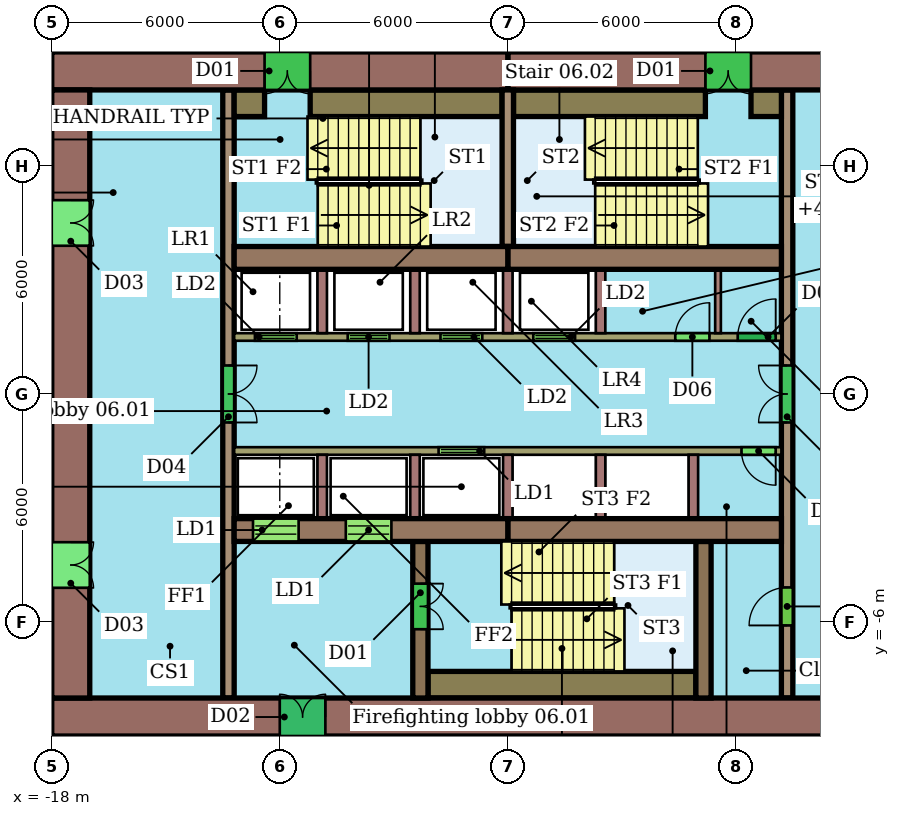
"""IFC4 building model, lengths in metres.
Left out: names, types, materials, properties, quantities, classifications, styles, units other than length and angle.
Written with IfcOpenShell. Run it as: python <this file> out.ifc"""

import sys

from ifc_helpers import new_model, si_unit, direction, frame, frame_2d, origin, place, context, subcontext, project, spatial, rectangle, extrude, element, fill, save


model = new_model("IFC4")
c1 = context("Model", 3, precision=1e-05, world=origin(), true_north=direction((0.0, 1.0)))
c2 = subcontext(c1, "Body", "Model", "MODEL_VIEW")
j1 = project(units=[si_unit("LENGTHUNIT", "METRE"), si_unit("PLANEANGLEUNIT", "RADIAN")], contexts=[c1])
p1 = place(None, origin())
s1 = spatial("IfcSite", under=j1, at=p1, CompositionType="ELEMENT")
p2 = place(p1, origin())
s2 = spatial("IfcBuilding", under=s1, at=p2, CompositionType="ELEMENT")
p3 = place(p2, frame((0.0, 0.0, 39.7)))
s3 = spatial("IfcBuildingStorey", under=s2, at=p3, CompositionType="ELEMENT", Elevation=39.7)
p4 = place(p3, frame((6.0, 8.5, 0.0), z_axis=(0.0, 0.0, 1.0), x_axis=(-1.0, 0.0, 0.0)))
e1 = element("IfcWall", 1, at=p4, inside=s3, PredefinedType="SHEAR", context=c2, shape_type="SweptSolid", body=[
    extrude(rectangle(XDim=12.0, YDim=1.0, at=frame_2d((6.0, 0.0))), origin(), (0.0, 0.0, 1.0), 3.4),
])
p5 = place(p4, frame((5.6, 0.0, 0.0)))
e2 = element("IfcOpeningElement", 2, at=p5, cuts=e1, PredefinedType="OPENING", context=c2, shape_type="SweptSolid", body=[
    extrude(rectangle(XDim=1.2, YDim=2.1, at=frame_2d((0.6, 1.05))), frame((0.0, 0.51, 0.0), z_axis=(0.0, -1.0, 0.0), x_axis=(1.0, 0.0, 0.0)), (0.0, 0.0, 1.0), 1.02),
])
p6 = place(p3, frame((-6.0, 8.5, 0.0), z_axis=(0.0, 0.0, 1.0), x_axis=(-1.0, 0.0, 0.0)))
e3 = element("IfcWall", 3, at=p6, inside=s3, PredefinedType="SHEAR", context=c2, shape_type="SweptSolid", body=[
    extrude(rectangle(XDim=12.0, YDim=1.0, at=frame_2d((6.0, 0.0))), origin(), (0.0, 0.0, 1.0), 3.4),
])
p7 = place(p6, frame((5.2, 0.0, 0.0)))
e4 = element("IfcOpeningElement", 4, at=p7, cuts=e3, PredefinedType="OPENING", context=c2, shape_type="SweptSolid", body=[
    extrude(rectangle(XDim=1.2, YDim=2.1, at=frame_2d((0.6, 1.05))), frame((0.0, 0.51, 0.0), z_axis=(0.0, -1.0, 0.0), x_axis=(1.0, 0.0, 0.0)), (0.0, 0.0, 1.0), 1.02),
])
p8 = place(p3, frame((-18.0, -8.5, 0.0), z_axis=(0.0, 0.0, 1.0), x_axis=(1.0, 0.0, 0.0)))
e5 = element("IfcWall", 5, at=p8, inside=s3, PredefinedType="SHEAR", context=c2, shape_type="SweptSolid", body=[
    extrude(rectangle(XDim=24.0, YDim=1.0, at=frame_2d((12.0, 0.0))), origin(), (0.0, 0.0, 1.0), 3.4),
])
p9 = place(p8, frame((6.0, 0.0, 0.0)))
e6 = element("IfcOpeningElement", 6, at=p9, cuts=e5, PredefinedType="OPENING", context=c2, shape_type="SweptSolid", body=[
    extrude(rectangle(XDim=1.2, YDim=2.1, at=frame_2d((0.6, 1.05))), frame((0.0, 0.51, 0.0), z_axis=(0.0, -1.0, 0.0), x_axis=(1.0, 0.0, 0.0)), (0.0, 0.0, 1.0), 1.02),
])
p10 = place(p3, frame((-17.5, 8.0, 0.0), z_axis=(0.0, 0.0, 1.0), x_axis=(0.0, -1.0, 0.0)))
e7 = element("IfcWall", 7, at=p10, inside=s3, PredefinedType="SHEAR", context=c2, shape_type="SweptSolid", body=[
    extrude(rectangle(XDim=16.0, YDim=1.0, at=frame_2d((8.0, 0.0))), origin(), (0.0, 0.0, 1.0), 3.4),
])
p11 = place(p10, frame((11.9, 0.0, 0.0)))
e8 = element("IfcOpeningElement", 8, at=p11, cuts=e7, PredefinedType="OPENING", context=c2, shape_type="SweptSolid", body=[
    extrude(rectangle(XDim=1.2, YDim=2.1, at=frame_2d((0.6, 1.05))), frame((0.0, 0.51, 0.0), z_axis=(0.0, -1.0, 0.0), x_axis=(1.0, 0.0, 0.0)), (0.0, 0.0, 1.0), 1.02),
])
p12 = place(p10, frame((2.9, 0.0, 0.0)))
e9 = element("IfcOpeningElement", 9, at=p12, cuts=e7, PredefinedType="OPENING", context=c2, shape_type="SweptSolid", body=[
    extrude(rectangle(XDim=1.2, YDim=2.1, at=frame_2d((0.6, 1.05))), frame((0.0, 0.51, 0.0), z_axis=(0.0, -1.0, 0.0), x_axis=(1.0, 0.0, 0.0)), (0.0, 0.0, 1.0), 1.02),
])
for number, where, z_axis, x_axis in (
    (10, (-13.2, 3.58, 0.0), (0.0, 0.0, 1.0), (1.0, 0.0, 0.0)),
    (11, (-6.0, 3.58, 0.0), (0.0, 0.0, 1.0), (1.0, 0.0, 0.0)),
):
    element("IfcWall", number, at=place(p3, frame(where, z_axis=z_axis, x_axis=x_axis)), inside=s3, PredefinedType="SHEAR", context=c2, shape_type="SweptSolid", body=[
        extrude(rectangle(XDim=7.2, YDim=0.6, at=frame_2d((3.6, 0.0))), origin(), (0.0, 0.0, 1.0), 3.4),
    ])
p13 = place(p3, frame((-13.2, -3.58, 0.0), z_axis=(0.0, 0.0, 1.0), x_axis=(1.0, 0.0, 0.0)))
e12 = element("IfcWall", 12, at=p13, inside=s3, PredefinedType="SHEAR", context=c2, shape_type="SweptSolid", body=[
    extrude(rectangle(XDim=7.2, YDim=0.6, at=frame_2d((3.6, 0.0))), origin(), (0.0, 0.0, 1.0), 3.4),
])
p14 = place(p13, frame((0.496, 0.0, 0.0)))
e13 = element("IfcOpeningElement", 13, at=p14, cuts=e12, PredefinedType="OPENING", context=c2, shape_type="SweptSolid", body=[
    extrude(rectangle(XDim=1.2, YDim=2.1, at=frame_2d((0.6, 1.05))), frame((0.0, 0.31, 0.0), z_axis=(0.0, -1.0, 0.0), x_axis=(1.0, 0.0, 0.0)), (0.0, 0.0, 1.0), 0.62),
])
p15 = place(p13, frame((2.938, 0.0, 0.0)))
e14 = element("IfcOpeningElement", 14, at=p15, cuts=e12, PredefinedType="OPENING", context=c2, shape_type="SweptSolid", body=[
    extrude(rectangle(XDim=1.2, YDim=2.1, at=frame_2d((0.6, 1.05))), frame((0.0, 0.31, 0.0), z_axis=(0.0, -1.0, 0.0), x_axis=(1.0, 0.0, 0.0)), (0.0, 0.0, 1.0), 0.62),
])
p16 = place(p3, frame((-6.0, -3.58, 0.0), z_axis=(0.0, 0.0, 1.0), x_axis=(1.0, 0.0, 0.0)))
e15 = element("IfcWall", 15, at=p16, inside=s3, PredefinedType="SHEAR", context=c2, shape_type="SweptSolid", body=[
    extrude(rectangle(XDim=7.2, YDim=0.6, at=frame_2d((3.6, 0.0))), origin(), (0.0, 0.0, 1.0), 3.4),
])
p17 = place(p3, frame((-13.35, 8.0, 0.0), z_axis=(0.0, 0.0, 1.0), x_axis=(0.0, -1.0, 0.0)))
e16 = element("IfcWall", 16, at=p17, inside=s3, PredefinedType="SHEAR", context=c2, shape_type="SweptSolid", body=[
    extrude(rectangle(XDim=16.0, YDim=0.3, at=frame_2d((8.0, 0.0))), origin(), (0.0, 0.0, 1.0), 3.4),
])
p18 = place(p17, frame((7.25, 0.0, 0.0)))
e17 = element("IfcOpeningElement", 17, at=p18, cuts=e16, PredefinedType="OPENING", context=c2, shape_type="SweptSolid", body=[
    extrude(rectangle(XDim=1.5, YDim=2.1, at=frame_2d((0.75, 1.05))), frame((0.0, 0.16, 0.0), z_axis=(0.0, -1.0, 0.0), x_axis=(1.0, 0.0, 0.0)), (0.0, 0.0, 1.0), 0.32),
])
p19 = place(p3, frame((1.35, -8.0, 0.0), z_axis=(0.0, 0.0, 1.0), x_axis=(0.0, 1.0, 0.0)))
e18 = element("IfcWall", 18, at=p19, inside=s3, PredefinedType="SHEAR", context=c2, shape_type="SweptSolid", body=[
    extrude(rectangle(XDim=16.0, YDim=0.3, at=frame_2d((8.0, 0.0))), origin(), (0.0, 0.0, 1.0), 3.4),
])
p20 = place(p19, frame((1.91, 0.0, 0.0)))
e19 = element("IfcOpeningElement", 19, at=p20, cuts=e18, PredefinedType="OPENING", context=c2, shape_type="SweptSolid", body=[
    extrude(rectangle(XDim=1.0, YDim=2.1, at=frame_2d((0.5, 1.05))), frame((0.0, 0.16, 0.0), z_axis=(0.0, -1.0, 0.0), x_axis=(1.0, 0.0, 0.0)), (0.0, 0.0, 1.0), 0.32),
])
p21 = place(p19, frame((7.25, 0.0, 0.0)))
e20 = element("IfcOpeningElement", 20, at=p21, cuts=e18, PredefinedType="OPENING", context=c2, shape_type="SweptSolid", body=[
    extrude(rectangle(XDim=1.5, YDim=2.1, at=frame_2d((0.75, 1.05))), frame((0.0, 0.16, 0.0), z_axis=(0.0, -1.0, 0.0), x_axis=(1.0, 0.0, 0.0)), (0.0, 0.0, 1.0), 0.32),
])
p22 = place(p3, frame((-13.2, 1.5, 0.0), z_axis=(0.0, 0.0, 1.0), x_axis=(1.0, 0.0, 0.0)))
e21 = element("IfcWall", 21, at=p22, inside=s3, PredefinedType="SHEAR", context=c2, shape_type="SweptSolid", body=[
    extrude(rectangle(XDim=14.4, YDim=0.2, at=frame_2d((7.2, 0.0))), origin(), (0.0, 0.0, 1.0), 3.4),
])
p23 = place(p22, frame((0.546, 0.0, 0.0)))
e22 = element("IfcOpeningElement", 22, at=p23, cuts=e21, PredefinedType="OPENING", context=c2, shape_type="SweptSolid", body=[
    extrude(rectangle(XDim=1.1, YDim=2.1, at=frame_2d((0.55, 1.05))), frame((0.0, 0.11, 0.0), z_axis=(0.0, -1.0, 0.0), x_axis=(1.0, 0.0, 0.0)), (0.0, 0.0, 1.0), 0.22),
])
p24 = place(p22, frame((2.988, 0.0, 0.0)))
e23 = element("IfcOpeningElement", 23, at=p24, cuts=e21, PredefinedType="OPENING", context=c2, shape_type="SweptSolid", body=[
    extrude(rectangle(XDim=1.1, YDim=2.1, at=frame_2d((0.55, 1.05))), frame((0.0, 0.11, 0.0), z_axis=(0.0, -1.0, 0.0), x_axis=(1.0, 0.0, 0.0)), (0.0, 0.0, 1.0), 0.22),
])
p25 = place(p22, frame((5.429, 0.0, 0.0)))
e24 = element("IfcOpeningElement", 24, at=p25, cuts=e21, PredefinedType="OPENING", context=c2, shape_type="SweptSolid", body=[
    extrude(rectangle(XDim=1.1, YDim=2.1, at=frame_2d((0.55, 1.05))), frame((0.0, 0.11, 0.0), z_axis=(0.0, -1.0, 0.0), x_axis=(1.0, 0.0, 0.0)), (0.0, 0.0, 1.0), 0.22),
])
p26 = place(p22, frame((7.871, 0.0, 0.0)))
e25 = element("IfcOpeningElement", 25, at=p26, cuts=e21, PredefinedType="OPENING", context=c2, shape_type="SweptSolid", body=[
    extrude(rectangle(XDim=1.1, YDim=2.1, at=frame_2d((0.55, 1.05))), frame((0.0, 0.11, 0.0), z_axis=(0.0, -1.0, 0.0), x_axis=(1.0, 0.0, 0.0)), (0.0, 0.0, 1.0), 0.22),
])
p27 = place(p22, frame((11.607, 0.0, 0.0)))
e26 = element("IfcOpeningElement", 26, at=p27, cuts=e21, PredefinedType="OPENING", context=c2, shape_type="SweptSolid", body=[
    extrude(rectangle(XDim=0.9, YDim=2.1, at=frame_2d((0.45, 1.05))), frame((0.0, 0.11, 0.0), z_axis=(0.0, -1.0, 0.0), x_axis=(1.0, 0.0, 0.0)), (0.0, 0.0, 1.0), 0.22),
])
p28 = place(p22, frame((13.25, 0.0, 0.0)))
e27 = element("IfcOpeningElement", 27, at=p28, cuts=e21, PredefinedType="OPENING", context=c2, shape_type="SweptSolid", body=[
    extrude(rectangle(XDim=1.0, YDim=2.1, at=frame_2d((0.5, 1.05))), frame((0.0, 0.11, 0.0), z_axis=(0.0, -1.0, 0.0), x_axis=(1.0, 0.0, 0.0)), (0.0, 0.0, 1.0), 0.22),
])
p29 = place(p3, frame((1.2, -1.5, 0.0), z_axis=(0.0, 0.0, 1.0), x_axis=(-1.0, 0.0, 0.0)))
e28 = element("IfcWall", 28, at=p29, inside=s3, PredefinedType="SHEAR", context=c2, shape_type="SweptSolid", body=[
    extrude(rectangle(XDim=14.4, YDim=0.2, at=frame_2d((7.2, 0.0))), origin(), (0.0, 0.0, 1.0), 3.4),
])
p30 = place(p29, frame((7.821, 0.0, 0.0)))
e29 = element("IfcOpeningElement", 29, at=p30, cuts=e28, PredefinedType="OPENING", context=c2, shape_type="SweptSolid", body=[
    extrude(rectangle(XDim=1.2, YDim=2.1, at=frame_2d((0.6, 1.05))), frame((0.0, 0.11, 0.0), z_axis=(0.0, -1.0, 0.0), x_axis=(1.0, 0.0, 0.0)), (0.0, 0.0, 1.0), 0.22),
])
p31 = place(p29, frame((0.15, 0.0, 0.0)))
e30 = element("IfcOpeningElement", 30, at=p31, cuts=e28, PredefinedType="OPENING", context=c2, shape_type="SweptSolid", body=[
    extrude(rectangle(XDim=0.9, YDim=2.1, at=frame_2d((0.45, 1.05))), frame((0.0, 0.11, 0.0), z_axis=(0.0, -1.0, 0.0), x_axis=(1.0, 0.0, 0.0)), (0.0, 0.0, 1.0), 0.22),
])
p32 = place(p3, frame((-8.3, -3.88, 0.0), z_axis=(0.0, 0.0, 1.0), x_axis=(0.0, -1.0, 0.0)))
e31 = element("IfcWall", 31, at=p32, inside=s3, PredefinedType="SHEAR", context=c2, shape_type="SweptSolid", body=[
    extrude(rectangle(XDim=4.12, YDim=0.4, at=frame_2d((2.06, 0.0))), origin(), (0.0, 0.0, 1.0), 3.4),
])
p33 = place(p32, frame((1.11, 0.0, 0.0)))
e32 = element("IfcOpeningElement", 32, at=p33, cuts=e31, PredefinedType="OPENING", context=c2, shape_type="SweptSolid", body=[
    extrude(rectangle(XDim=1.2, YDim=2.1, at=frame_2d((0.6, 1.05))), frame((0.0, 0.21, 0.0), z_axis=(0.0, -1.0, 0.0), x_axis=(1.0, 0.0, 0.0)), (0.0, 0.0, 1.0), 0.42),
])
p34 = place(p3, frame((-0.85, -3.88, 0.0), z_axis=(0.0, 0.0, 1.0), x_axis=(0.0, -1.0, 0.0)))
e33 = element("IfcWall", 33, at=p34, inside=s3, PredefinedType="SHEAR", context=c2, shape_type="SweptSolid", body=[
    extrude(rectangle(XDim=4.12, YDim=0.4, at=frame_2d((2.06, 0.0))), origin(), (0.0, 0.0, 1.0), 3.4),
])
p35 = place(p3, frame((-6.0, 3.88, 0.0), z_axis=(0.0, 0.0, 1.0), x_axis=(0.0, 1.0, 0.0)))
e34 = element("IfcWall", 34, at=p35, inside=s3, PredefinedType="SHEAR", context=c2, shape_type="SweptSolid", body=[
    extrude(rectangle(XDim=4.12, YDim=0.3, at=frame_2d((2.06, 0.0))), origin(), (0.0, 0.0, 1.0), 3.4),
])
p36 = place(p3, frame((-13.2, 7.65, 0.0), z_axis=(0.0, 0.0, 1.0), x_axis=(1.0, 0.0, 0.0)))
e35 = element("IfcWall", 35, at=p36, inside=s3, PredefinedType="SHEAR", context=c2, shape_type="SweptSolid", body=[
    extrude(rectangle(XDim=0.8, YDim=0.7, at=frame_2d((0.4, 0.0))), origin(), (0.0, 0.0, 1.0), 3.4),
])
for number, where, z_axis, x_axis in (
    (36, (-11.2, 7.65, 0.0), (0.0, 0.0, 1.0), (1.0, 0.0, 0.0)),
    (37, (-5.85, 7.65, 0.0), (0.0, 0.0, 1.0), (1.0, 0.0, 0.0)),
):
    element("IfcWall", number, at=place(p3, frame(where, z_axis=z_axis, x_axis=x_axis)), inside=s3, PredefinedType="SHEAR", context=c2, shape_type="SweptSolid", body=[
        extrude(rectangle(XDim=5.05, YDim=0.7, at=frame_2d((2.525, 0.0))), origin(), (0.0, 0.0, 1.0), 3.4),
    ])
p37 = place(p3, frame((0.4, 7.65, 0.0), z_axis=(0.0, 0.0, 1.0), x_axis=(1.0, 0.0, 0.0)))
e38 = element("IfcWall", 38, at=p37, inside=s3, PredefinedType="SHEAR", context=c2, shape_type="SweptSolid", body=[
    extrude(rectangle(XDim=0.8, YDim=0.7, at=frame_2d((0.4, 0.0))), origin(), (0.0, 0.0, 1.0), 3.4),
])
p38 = place(p3, frame((-8.1, -7.65, 0.0), z_axis=(0.0, 0.0, 1.0), x_axis=(1.0, 0.0, 0.0)))
e39 = element("IfcWall", 39, at=p38, inside=s3, PredefinedType="SHEAR", context=c2, shape_type="SweptSolid", body=[
    extrude(rectangle(XDim=7.05, YDim=0.7, at=frame_2d((3.525, 0.0))), origin(), (0.0, 0.0, 1.0), 3.4),
])
for number, where, z_axis, x_axis in (
    (40, (-10.883, 1.6, 0.0), (0.0, 0.0, 1.0), (0.0, 1.0, 0.0)),
    (41, (-8.442, 1.6, 0.0), (0.0, 0.0, 1.0), (0.0, 1.0, 0.0)),
    (42, (-6.0, 1.6, 0.0), (0.0, 0.0, 1.0), (0.0, 1.0, 0.0)),
    (43, (-3.558, 1.6, 0.0), (0.0, 0.0, 1.0), (0.0, 1.0, 0.0)),
):
    element("IfcWall", number, at=place(p3, frame(where, z_axis=z_axis, x_axis=x_axis)), inside=s3, PredefinedType="SHEAR", context=c2, shape_type="SweptSolid", body=[
        extrude(rectangle(XDim=1.68, YDim=0.25, at=frame_2d((0.84, 0.0))), origin(), (0.0, 0.0, 1.0), 3.4),
    ])
p39 = place(p3, frame((-0.468, 1.6, 0.0), z_axis=(0.0, 0.0, 1.0), x_axis=(0.0, 1.0, 0.0)))
e44 = element("IfcWall", 44, at=p39, inside=s3, PredefinedType="PARTITIONING", context=c2, shape_type="SweptSolid", body=[
    extrude(rectangle(XDim=1.68, YDim=0.15, at=frame_2d((0.84, 0.0))), origin(), (0.0, 0.0, 1.0), 3.4),
])
for number, where, z_axis, x_axis in (
    (45, (-10.883, -1.6, 0.0), (0.0, 0.0, 1.0), (0.0, -1.0, 0.0)),
    (46, (-8.442, -1.6, 0.0), (0.0, 0.0, 1.0), (0.0, -1.0, 0.0)),
    (47, (-6.0, -1.6, 0.0), (0.0, 0.0, 1.0), (0.0, -1.0, 0.0)),
    (48, (-3.558, -1.6, 0.0), (0.0, 0.0, 1.0), (0.0, -1.0, 0.0)),
    (49, (-1.117, -1.6, 0.0), (0.0, 0.0, 1.0), (0.0, -1.0, 0.0)),
):
    element("IfcWall", number, at=place(p3, frame(where, z_axis=z_axis, x_axis=x_axis)), inside=s3, PredefinedType="SHEAR", context=c2, shape_type="SweptSolid", body=[
        extrude(rectangle(XDim=1.68, YDim=0.25, at=frame_2d((0.84, 0.0))), origin(), (0.0, 0.0, 1.0), 3.4),
    ])
p40 = place(p5, origin())
e50 = element("IfcDoor", 50, at=p40, inside=s3, OperationType="DOUBLE_DOOR_SINGLE_SWING", PredefinedType="NOTDEFINED", context=c2, shape_type="SweptSolid", body=[
    extrude(rectangle(XDim=1.2, YDim=2.1, at=frame_2d((0.6, 1.05))), frame((0.0, 0.025, 0.0), z_axis=(0.0, -1.0, 0.0), x_axis=(1.0, 0.0, 0.0)), (0.0, 0.0, 1.0), 0.05),
])
fill(e2, e50)
p41 = place(p7, origin())
e51 = element("IfcDoor", 51, at=p41, inside=s3, OperationType="DOUBLE_DOOR_SINGLE_SWING", PredefinedType="NOTDEFINED", context=c2, shape_type="SweptSolid", body=[
    extrude(rectangle(XDim=1.2, YDim=2.1, at=frame_2d((0.6, 1.05))), frame((0.0, 0.025, 0.0), z_axis=(0.0, -1.0, 0.0), x_axis=(1.0, 0.0, 0.0)), (0.0, 0.0, 1.0), 0.05),
])
fill(e4, e51)
p42 = place(p9, origin())
e52 = element("IfcDoor", 52, at=p42, inside=s3, OperationType="DOUBLE_DOOR_SINGLE_SWING", PredefinedType="NOTDEFINED", context=c2, shape_type="SweptSolid", body=[
    extrude(rectangle(XDim=1.2, YDim=2.1, at=frame_2d((0.6, 1.05))), frame((0.0, 0.025, 0.0), z_axis=(0.0, -1.0, 0.0), x_axis=(1.0, 0.0, 0.0)), (0.0, 0.0, 1.0), 0.05),
])
fill(e6, e52)
p43 = place(p11, origin())
e53 = element("IfcDoor", 53, at=p43, inside=s3, OperationType="DOUBLE_DOOR_SINGLE_SWING", PredefinedType="NOTDEFINED", context=c2, shape_type="SweptSolid", body=[
    extrude(rectangle(XDim=1.2, YDim=2.1, at=frame_2d((0.6, 1.05))), frame((0.0, 0.025, 0.0), z_axis=(0.0, -1.0, 0.0), x_axis=(1.0, 0.0, 0.0)), (0.0, 0.0, 1.0), 0.05),
])
fill(e8, e53)
p44 = place(p12, origin())
e54 = element("IfcDoor", 54, at=p44, inside=s3, OperationType="DOUBLE_DOOR_SINGLE_SWING", PredefinedType="NOTDEFINED", context=c2, shape_type="SweptSolid", body=[
    extrude(rectangle(XDim=1.2, YDim=2.1, at=frame_2d((0.6, 1.05))), frame((0.0, 0.025, 0.0), z_axis=(0.0, -1.0, 0.0), x_axis=(1.0, 0.0, 0.0)), (0.0, 0.0, 1.0), 0.05),
])
fill(e9, e54)
p45 = place(p14, origin())
e55 = element("IfcDoor", 55, at=p45, inside=s3, OperationType="DOUBLE_DOOR_SLIDING", PredefinedType="NOTDEFINED", context=c2, shape_type="SweptSolid", body=[
    extrude(rectangle(XDim=1.2, YDim=2.1, at=frame_2d((0.6, 1.05))), frame((0.0, 0.025, 0.0), z_axis=(0.0, -1.0, 0.0), x_axis=(1.0, 0.0, 0.0)), (0.0, 0.0, 1.0), 0.05),
])
fill(e13, e55)
p46 = place(p15, origin())
e56 = element("IfcDoor", 56, at=p46, inside=s3, OperationType="DOUBLE_DOOR_SLIDING", PredefinedType="NOTDEFINED", context=c2, shape_type="SweptSolid", body=[
    extrude(rectangle(XDim=1.2, YDim=2.1, at=frame_2d((0.6, 1.05))), frame((0.0, 0.025, 0.0), z_axis=(0.0, -1.0, 0.0), x_axis=(1.0, 0.0, 0.0)), (0.0, 0.0, 1.0), 0.05),
])
fill(e14, e56)
p47 = place(p18, origin())
e57 = element("IfcDoor", 57, at=p47, inside=s3, OperationType="DOUBLE_DOOR_SINGLE_SWING", PredefinedType="NOTDEFINED", context=c2, shape_type="SweptSolid", body=[
    extrude(rectangle(XDim=1.5, YDim=2.1, at=frame_2d((0.75, 1.05))), frame((0.0, 0.025, 0.0), z_axis=(0.0, -1.0, 0.0), x_axis=(1.0, 0.0, 0.0)), (0.0, 0.0, 1.0), 0.05),
])
fill(e17, e57)
p48 = place(p20, origin())
e58 = element("IfcDoor", 58, at=p48, inside=s3, OperationType="SINGLE_SWING_LEFT", PredefinedType="NOTDEFINED", context=c2, shape_type="SweptSolid", body=[
    extrude(rectangle(XDim=1.0, YDim=2.1, at=frame_2d((0.5, 1.05))), frame((0.0, 0.025, 0.0), z_axis=(0.0, -1.0, 0.0), x_axis=(1.0, 0.0, 0.0)), (0.0, 0.0, 1.0), 0.05),
])
fill(e19, e58)
p49 = place(p21, origin())
e59 = element("IfcDoor", 59, at=p49, inside=s3, OperationType="DOUBLE_DOOR_SINGLE_SWING", PredefinedType="NOTDEFINED", context=c2, shape_type="SweptSolid", body=[
    extrude(rectangle(XDim=1.5, YDim=2.1, at=frame_2d((0.75, 1.05))), frame((0.0, 0.025, 0.0), z_axis=(0.0, -1.0, 0.0), x_axis=(1.0, 0.0, 0.0)), (0.0, 0.0, 1.0), 0.05),
])
fill(e20, e59)
p50 = place(p23, origin())
e60 = element("IfcDoor", 60, at=p50, inside=s3, OperationType="DOUBLE_DOOR_SLIDING", PredefinedType="NOTDEFINED", context=c2, shape_type="SweptSolid", body=[
    extrude(rectangle(XDim=1.1, YDim=2.1, at=frame_2d((0.55, 1.05))), frame((0.0, 0.025, 0.0), z_axis=(0.0, -1.0, 0.0), x_axis=(1.0, 0.0, 0.0)), (0.0, 0.0, 1.0), 0.05),
])
fill(e22, e60)
p51 = place(p24, origin())
e61 = element("IfcDoor", 61, at=p51, inside=s3, OperationType="DOUBLE_DOOR_SLIDING", PredefinedType="NOTDEFINED", context=c2, shape_type="SweptSolid", body=[
    extrude(rectangle(XDim=1.1, YDim=2.1, at=frame_2d((0.55, 1.05))), frame((0.0, 0.025, 0.0), z_axis=(0.0, -1.0, 0.0), x_axis=(1.0, 0.0, 0.0)), (0.0, 0.0, 1.0), 0.05),
])
fill(e23, e61)
p52 = place(p25, origin())
e62 = element("IfcDoor", 62, at=p52, inside=s3, OperationType="DOUBLE_DOOR_SLIDING", PredefinedType="NOTDEFINED", context=c2, shape_type="SweptSolid", body=[
    extrude(rectangle(XDim=1.1, YDim=2.1, at=frame_2d((0.55, 1.05))), frame((0.0, 0.025, 0.0), z_axis=(0.0, -1.0, 0.0), x_axis=(1.0, 0.0, 0.0)), (0.0, 0.0, 1.0), 0.05),
])
fill(e24, e62)
p53 = place(p26, origin())
e63 = element("IfcDoor", 63, at=p53, inside=s3, OperationType="DOUBLE_DOOR_SLIDING", PredefinedType="NOTDEFINED", context=c2, shape_type="SweptSolid", body=[
    extrude(rectangle(XDim=1.1, YDim=2.1, at=frame_2d((0.55, 1.05))), frame((0.0, 0.025, 0.0), z_axis=(0.0, -1.0, 0.0), x_axis=(1.0, 0.0, 0.0)), (0.0, 0.0, 1.0), 0.05),
])
fill(e25, e63)
p54 = place(p27, origin())
e64 = element("IfcDoor", 64, at=p54, inside=s3, OperationType="SINGLE_SWING_RIGHT", PredefinedType="NOTDEFINED", context=c2, shape_type="SweptSolid", body=[
    extrude(rectangle(XDim=0.9, YDim=2.1, at=frame_2d((0.45, 1.05))), frame((0.0, 0.025, 0.0), z_axis=(0.0, -1.0, 0.0), x_axis=(1.0, 0.0, 0.0)), (0.0, 0.0, 1.0), 0.05),
])
fill(e26, e64)
p55 = place(p28, origin())
e65 = element("IfcDoor", 65, at=p55, inside=s3, OperationType="SINGLE_SWING_RIGHT", PredefinedType="NOTDEFINED", context=c2, shape_type="SweptSolid", body=[
    extrude(rectangle(XDim=1.0, YDim=2.1, at=frame_2d((0.5, 1.05))), frame((0.0, 0.025, 0.0), z_axis=(0.0, -1.0, 0.0), x_axis=(1.0, 0.0, 0.0)), (0.0, 0.0, 1.0), 0.05),
])
fill(e27, e65)
p56 = place(p30, origin())
e66 = element("IfcDoor", 66, at=p56, inside=s3, OperationType="DOUBLE_DOOR_SLIDING", PredefinedType="NOTDEFINED", context=c2, shape_type="SweptSolid", body=[
    extrude(rectangle(XDim=1.2, YDim=2.1, at=frame_2d((0.6, 1.05))), frame((0.0, 0.025, 0.0), z_axis=(0.0, -1.0, 0.0), x_axis=(1.0, 0.0, 0.0)), (0.0, 0.0, 1.0), 0.05),
])
fill(e29, e66)
p57 = place(p31, origin())
e67 = element("IfcDoor", 67, at=p57, inside=s3, OperationType="SINGLE_SWING_LEFT", PredefinedType="NOTDEFINED", context=c2, shape_type="SweptSolid", body=[
    extrude(rectangle(XDim=0.9, YDim=2.1, at=frame_2d((0.45, 1.05))), frame((0.0, 0.025, 0.0), z_axis=(0.0, -1.0, 0.0), x_axis=(1.0, 0.0, 0.0)), (0.0, 0.0, 1.0), 0.05),
])
fill(e30, e67)
p58 = place(p33, origin())
e68 = element("IfcDoor", 68, at=p58, inside=s3, OperationType="DOUBLE_DOOR_SINGLE_SWING", PredefinedType="NOTDEFINED", context=c2, shape_type="SweptSolid", body=[
    extrude(rectangle(XDim=1.2, YDim=2.1, at=frame_2d((0.6, 1.05))), frame((0.0, 0.025, 0.0), z_axis=(0.0, -1.0, 0.0), x_axis=(1.0, 0.0, 0.0)), (0.0, 0.0, 1.0), 0.05),
])
fill(e32, e68)
save(model, sys.argv[1])
